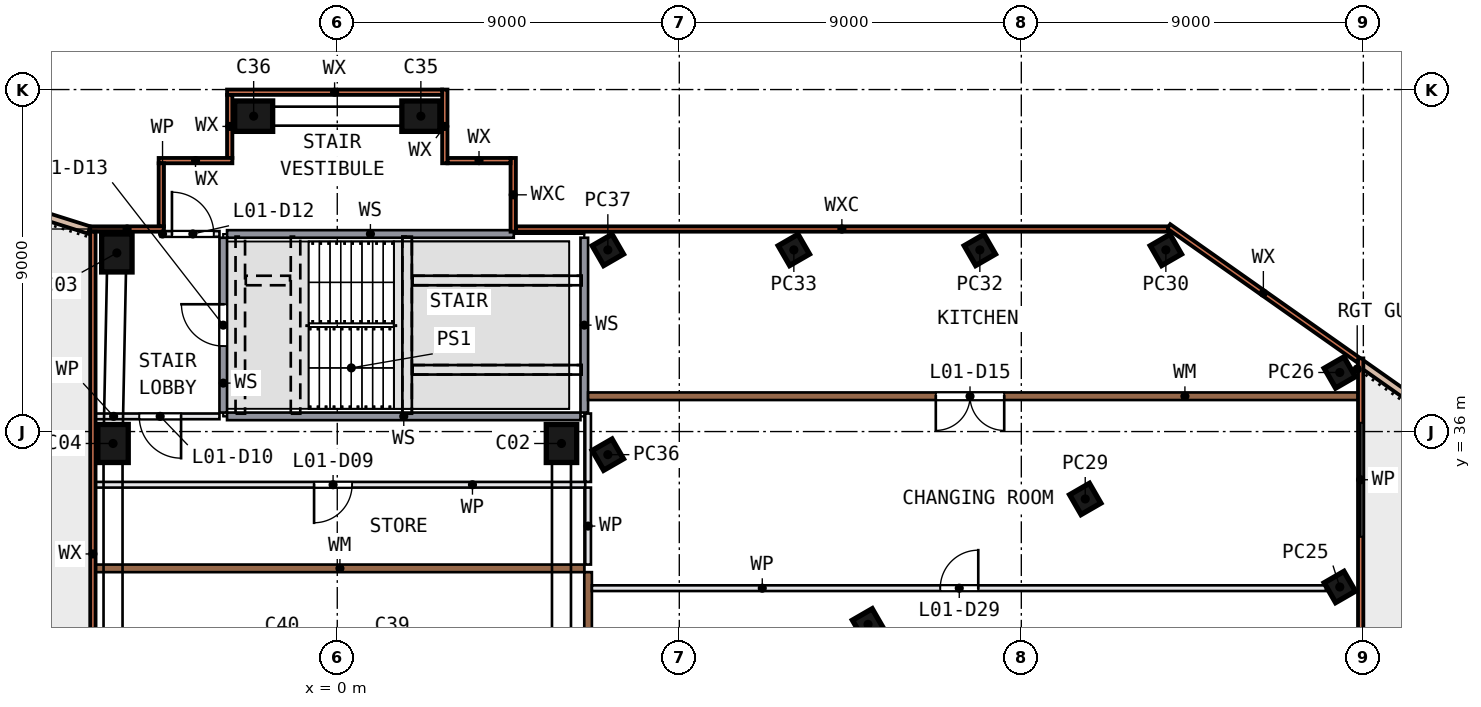
"""IFC4 building model, lengths in metres.
Left out: names, types, materials, properties, quantities, classifications, styles, units other than length and angle.
Written with IfcOpenShell. Run it as: python <this file> out.ifc"""

import sys

from ifc_helpers import new_model, si_unit, direction, frame, frame_2d, origin, origin_2d, place, context, subcontext, project, spatial, polyline, rectangle, outline, extrude, element, fill, save


model = new_model("IFC4")
c1 = context("Model", 3, precision=1e-05, world=origin(), true_north=direction((0.0, 1.0)))
c2 = subcontext(c1, "Body", "Model", "MODEL_VIEW")
j1 = project(units=[si_unit("LENGTHUNIT", "METRE"), si_unit("PLANEANGLEUNIT", "RADIAN")], contexts=[c1])
p1 = place(None, origin())
s1 = spatial("IfcSite", under=j1, at=p1, CompositionType="ELEMENT")
p2 = place(p1, origin())
s2 = spatial("IfcBuilding", under=s1, at=p2, CompositionType="ELEMENT")
p3 = place(p2, frame((0.0, 0.0, 8.0)))
s3 = spatial("IfcBuildingStorey", under=s2, at=p3, CompositionType="ELEMENT", Elevation=8.0)
for number, where, z_axis, x_axis in (
    (1, (5.9, 35.686, 0.0), (0.0, 0.0, 1.0), (0.0, 1.0, 0.0)),
    (2, (-5.8, 40.7, 0.0), (0.0, 0.0, 1.0), (0.0, -1.0, 0.0)),
    (3, (-5.9, 35.686, 0.0), (0.0, 0.0, 1.0), (0.0, -1.0, 0.0)),
    (4, (2.2, 44.3, 0.0), (0.0, 0.0, 1.0), (-1.0, 0.0, 0.0)),
    (5, (-2.2, 44.3, 0.0), (0.0, 0.0, 1.0), (-1.0, 0.0, 0.0)),
):
    element("IfcColumn", number, at=place(p3, frame(where, z_axis=z_axis, x_axis=x_axis)), inside=s3, PredefinedType="COLUMN", context=c2, shape_type="SweptSolid", body=[
        extrude(rectangle(XDim=1.0, YDim=0.8, at=origin_2d()), origin(), (0.0, 0.0, 1.0), 5.55),
    ])
for number, where, z_axis, x_axis in (
    (6, (26.38, 31.91, 0.0), (0.0, 0.0, 1.0), (0.866, 0.5, 0.0)),
    (7, (26.38, 37.555, 0.0), (0.0, 0.0, 1.0), (0.866, 0.5, 0.0)),
    (8, (19.682, 34.227, 0.0), (0.0, 0.0, 1.0), (0.866, 0.5, 0.0)),
    (9, (21.803, 40.78, 0.0), (0.0, 0.0, 1.0), (0.866, 0.5, 0.0)),
    (10, (13.966, 30.927, 0.0), (0.0, 0.0, 1.0), (0.866, 0.5, 0.0)),
    (11, (16.909, 40.78, 0.0), (0.0, 0.0, 1.0), (0.866, 0.5, 0.0)),
    (12, (12.014, 40.78, 0.0), (0.0, 0.0, 1.0), (0.866, 0.5, 0.0)),
    (13, (7.12, 35.392, 0.0), (0.0, 0.0, 1.0), (0.866, 0.5, 0.0)),
    (14, (7.12, 40.78, 0.0), (0.0, 0.0, 1.0), (0.866, 0.5, 0.0)),
):
    element("IfcColumn", number, at=place(p3, frame(where, z_axis=z_axis, x_axis=x_axis)), inside=s3, PredefinedType="COLUMN", context=c2, shape_type="SweptSolid", body=[
        extrude(rectangle(XDim=0.6, YDim=0.6, at=origin_2d()), origin(), (0.0, 0.0, 1.0), 6.0),
    ])
p4 = place(p3, frame((26.93, 20.14, 0.0), z_axis=(0.0, 0.0, 1.0), x_axis=(0.0, 1.0, 0.0)))
e15 = element("IfcWall", 15, at=p4, inside=s3, PredefinedType="SOLIDWALL", context=c2, shape_type="SweptSolid", body=[
    extrude(rectangle(XDim=17.786, YDim=0.14, at=frame_2d((8.893, 0.0))), origin(), (0.0, 0.0, 1.0), 5.55),
])
p5 = place(p4, frame((1.802, 0.0, 0.9)))
e16 = element("IfcOpeningElement", 16, at=p5, cuts=e15, PredefinedType="OPENING", context=c2, shape_type="SweptSolid", body=[
    extrude(rectangle(XDim=3.0, YDim=3.6, at=frame_2d((1.5, 1.8))), frame((0.0, 0.08, 0.0), z_axis=(0.0, -1.0, 0.0), x_axis=(1.0, 0.0, 0.0)), (0.0, 0.0, 1.0), 0.16),
])
p6 = place(p4, frame((7.448, 0.0, 0.9)))
e17 = element("IfcOpeningElement", 17, at=p6, cuts=e15, PredefinedType="OPENING", context=c2, shape_type="SweptSolid", body=[
    extrude(rectangle(XDim=3.0, YDim=3.6, at=frame_2d((1.5, 1.8))), frame((0.0, 0.08, 0.0), z_axis=(0.0, -1.0, 0.0), x_axis=(1.0, 0.0, 0.0)), (0.0, 0.0, 1.0), 0.16),
])
p7 = place(p4, frame((13.092, 0.0, 0.9)))
e18 = element("IfcOpeningElement", 18, at=p7, cuts=e15, PredefinedType="OPENING", context=c2, shape_type="SweptSolid", body=[
    extrude(rectangle(XDim=3.0, YDim=3.6, at=frame_2d((1.5, 1.8))), frame((0.0, 0.08, 0.0), z_axis=(0.0, -1.0, 0.0), x_axis=(1.0, 0.0, 0.0)), (0.0, 0.0, 1.0), 0.16),
])
p8 = place(p3, frame((26.86, 37.889, 0.0), z_axis=(0.0, 0.0, 1.0), x_axis=(-0.817411697, 0.576053919, 0.0)))
e19 = element("IfcWall", 19, at=p8, inside=s3, PredefinedType="SOLIDWALL", context=c2, shape_type="SweptSolid", body=[
    extrude(rectangle(XDim=6.094, YDim=0.14, at=frame_2d((3.047, 0.0))), origin(), (0.0, 0.0, 1.0), 5.55),
])
p9 = place(p3, frame((21.856, 41.33, 0.0), z_axis=(0.0, 0.0, 1.0), x_axis=(-1.0, 0.0, 0.0)))
e20 = element("IfcWall", 20, at=p9, inside=s3, PredefinedType="SOLIDWALL", context=c2, shape_type="SweptSolid", body=[
    extrude(rectangle(XDim=17.156, YDim=0.14, at=frame_2d((8.578, 0.0))), origin(), (0.0, 0.0, 1.0), 5.55),
])
p10 = place(p3, frame((4.63, 41.26, 0.0), z_axis=(0.0, 0.0, 1.0), x_axis=(0.0, 1.0, 0.0)))
e21 = element("IfcWall", 21, at=p10, inside=s3, PredefinedType="SOLIDWALL", context=c2, shape_type="SweptSolid", body=[
    extrude(rectangle(XDim=1.94, YDim=0.14, at=frame_2d((0.97, 0.0))), origin(), (0.0, 0.0, 1.0), 5.55),
])
p11 = place(p3, frame((4.56, 43.13, 0.0), z_axis=(0.0, 0.0, 1.0), x_axis=(-1.0, 0.0, 0.0)))
e22 = element("IfcWall", 22, at=p11, inside=s3, PredefinedType="SOLIDWALL", context=c2, shape_type="SweptSolid", body=[
    extrude(rectangle(XDim=1.66, YDim=0.14, at=frame_2d((0.83, 0.0))), origin(), (0.0, 0.0, 1.0), 5.55),
])
p12 = place(p3, frame((2.83, 43.06, 0.0), z_axis=(0.0, 0.0, 1.0), x_axis=(0.0, 1.0, 0.0)))
e23 = element("IfcWall", 23, at=p12, inside=s3, PredefinedType="SOLIDWALL", context=c2, shape_type="SweptSolid", body=[
    extrude(rectangle(XDim=1.94, YDim=0.14, at=frame_2d((0.97, 0.0))), origin(), (0.0, 0.0, 1.0), 5.55),
])
p13 = place(p3, frame((2.76, 44.93, 0.0), z_axis=(0.0, 0.0, 1.0), x_axis=(-1.0, 0.0, 0.0)))
e24 = element("IfcWall", 24, at=p13, inside=s3, PredefinedType="SOLIDWALL", context=c2, shape_type="SweptSolid", body=[
    extrude(rectangle(XDim=5.66, YDim=0.14, at=frame_2d((2.83, 0.0))), origin(), (0.0, 0.0, 1.0), 5.55),
])
p14 = place(p3, frame((-2.83, 44.86, 0.0), z_axis=(0.0, 0.0, 1.0), x_axis=(0.0, -1.0, 0.0)))
e25 = element("IfcWall", 25, at=p14, inside=s3, PredefinedType="SOLIDWALL", context=c2, shape_type="SweptSolid", body=[
    extrude(rectangle(XDim=1.66, YDim=0.14, at=frame_2d((0.83, 0.0))), origin(), (0.0, 0.0, 1.0), 5.55),
])
p15 = place(p3, frame((-2.76, 43.13, 0.0), z_axis=(0.0, 0.0, 1.0), x_axis=(-1.0, 0.0, 0.0)))
e26 = element("IfcWall", 26, at=p15, inside=s3, PredefinedType="SOLIDWALL", context=c2, shape_type="SweptSolid", body=[
    extrude(rectangle(XDim=1.94, YDim=0.14, at=frame_2d((0.97, 0.0))), origin(), (0.0, 0.0, 1.0), 5.55),
])
p16 = place(p3, frame((-4.63, 43.06, 0.0), z_axis=(0.0, 0.0, 1.0), x_axis=(0.0, -1.0, 0.0)))
e27 = element("IfcWall", 27, at=p16, inside=s3, PredefinedType="SOLIDWALL", context=c2, shape_type="SweptSolid", body=[
    extrude(rectangle(XDim=1.66, YDim=0.14, at=frame_2d((0.83, 0.0))), origin(), (0.0, 0.0, 1.0), 5.55),
])
p17 = place(p3, frame((-4.56, 41.33, 0.0), z_axis=(0.0, 0.0, 1.0), x_axis=(-1.0, 0.0, 0.0)))
e28 = element("IfcWall", 28, at=p17, inside=s3, PredefinedType="SOLIDWALL", context=c2, shape_type="SweptSolid", body=[
    extrude(rectangle(XDim=1.94, YDim=0.14, at=frame_2d((0.97, 0.0))), origin(), (0.0, 0.0, 1.0), 5.55),
])
p18 = place(p3, frame((-6.43, 41.26, 0.0), z_axis=(0.0, 0.0, 1.0), x_axis=(0.0, -1.0, 0.0)))
e29 = element("IfcWall", 29, at=p18, inside=s3, PredefinedType="SOLIDWALL", context=c2, shape_type="SweptSolid", body=[
    extrude(rectangle(XDim=16.961, YDim=0.14, at=frame_2d((8.481, 0.0))), origin(), (0.0, 0.0, 1.0), 5.55),
])
p19 = place(p3, origin())
e30 = element("IfcWall", 30, at=p19, inside=s3, PredefinedType="SOLIDWALL", context=c2, shape_type="SweptSolid", body=[
    extrude(outline(polyline([(-6.56, 41.209), (-6.5, 41.4), (-18.003, 45.035), (-17.987, 44.82), (-6.56, 41.209)])), origin(), (0.0, 0.0, 1.0), 0.45),
])
p20 = place(p3, origin())
e31 = element("IfcWall", 31, at=p20, inside=s3, PredefinedType="SOLIDWALL", context=c2, shape_type="SweptSolid", body=[
    extrude(outline(polyline([(32.328, 33.877), (32.5, 34.0), (27.0, 37.876), (26.885, 37.713), (32.328, 33.877)])), origin(), (0.0, 0.0, 1.0), 0.45),
])
p21 = place(p3, frame((6.525, 34.6, 0.0), z_axis=(0.0, 0.0, 1.0), x_axis=(-1.0, 0.0, 0.0)))
e32 = element("IfcWall", 32, at=p21, inside=s3, PredefinedType="PARTITIONING", context=c2, shape_type="SweptSolid", body=[
    extrude(rectangle(XDim=12.885, YDim=0.15, at=frame_2d((6.442, 0.0))), origin(), (0.0, 0.0, 1.0), 5.55),
])
p22 = place(p21, frame((6.135, 0.0, 0.0)))
e33 = element("IfcOpeningElement", 33, at=p22, cuts=e32, PredefinedType="OPENING", context=c2, shape_type="SweptSolid", body=[
    extrude(rectangle(XDim=1.0, YDim=2.1, at=frame_2d((0.5, 1.05))), frame((0.0, 0.085, 0.0), z_axis=(0.0, -1.0, 0.0), x_axis=(1.0, 0.0, 0.0)), (0.0, 0.0, 1.0), 0.17),
])
p23 = place(p3, frame((-3.1, 36.4, 0.0), z_axis=(0.0, 0.0, 1.0), x_axis=(-1.0, 0.0, 0.0)))
e34 = element("IfcWall", 34, at=p23, inside=s3, PredefinedType="PARTITIONING", context=c2, shape_type="SweptSolid", body=[
    extrude(rectangle(XDim=3.26, YDim=0.15, at=frame_2d((1.63, 0.0))), origin(), (0.0, 0.0, 1.0), 5.55),
])
p24 = place(p23, frame((1.01, 0.0, 0.0)))
e35 = element("IfcOpeningElement", 35, at=p24, cuts=e34, PredefinedType="OPENING", context=c2, shape_type="SweptSolid", body=[
    extrude(rectangle(XDim=1.1, YDim=2.1, at=frame_2d((0.55, 1.05))), frame((0.0, 0.085, 0.0), z_axis=(0.0, -1.0, 0.0), x_axis=(1.0, 0.0, 0.0)), (0.0, 0.0, 1.0), 0.17),
])
p25 = place(p3, frame((-2.9, 36.4, 0.0), z_axis=(0.0, 0.0, 1.0), x_axis=(1.0, 0.0, 0.0)))
e36 = element("IfcWall", 36, at=p25, inside=s3, PredefinedType="SOLIDWALL", context=c2, shape_type="SweptSolid", body=[
    extrude(rectangle(XDim=9.3, YDim=0.2, at=frame_2d((4.65, 0.0))), origin(), (0.0, 0.0, 1.0), 5.55),
])
p26 = place(p3, frame((-4.645, 41.2, 0.0), z_axis=(0.0, 0.0, 1.0), x_axis=(1.0, 0.0, 0.0)))
e37 = element("IfcWall", 37, at=p26, inside=s3, PredefinedType="PARTITIONING", context=c2, shape_type="SweptSolid", body=[
    extrude(rectangle(XDim=1.545, YDim=0.15, at=frame_2d((0.772, 0.0))), origin(), (0.0, 0.0, 1.0), 5.55),
])
p27 = place(p26, frame((0.295, 0.0, 0.0)))
e38 = element("IfcOpeningElement", 38, at=p27, cuts=e37, PredefinedType="OPENING", context=c2, shape_type="SweptSolid", body=[
    extrude(rectangle(XDim=1.1, YDim=2.1, at=frame_2d((0.55, 1.05))), frame((0.0, 0.085, 0.0), z_axis=(0.0, -1.0, 0.0), x_axis=(1.0, 0.0, 0.0)), (0.0, 0.0, 1.0), 0.17),
])
p28 = place(p3, frame((-3.0, 36.5, 0.0), z_axis=(0.0, 0.0, 1.0), x_axis=(0.0, 1.0, 0.0)))
e39 = element("IfcWall", 39, at=p28, inside=s3, PredefinedType="SOLIDWALL", context=c2, shape_type="SweptSolid", body=[
    extrude(rectangle(XDim=4.6, YDim=0.2, at=frame_2d((2.3, 0.0))), origin(), (0.0, 0.0, 1.0), 5.55),
])
p29 = place(p28, frame((1.75, 0.0, 0.0)))
e40 = element("IfcOpeningElement", 40, at=p29, cuts=e39, PredefinedType="OPENING", context=c2, shape_type="SweptSolid", body=[
    extrude(rectangle(XDim=1.1, YDim=2.1, at=frame_2d((0.55, 1.05))), frame((0.0, 0.11, 0.0), z_axis=(0.0, -1.0, 0.0), x_axis=(1.0, 0.0, 0.0)), (0.0, 0.0, 1.0), 0.22),
])
p30 = place(p3, frame((6.5, 36.5, 0.0), z_axis=(0.0, 0.0, 1.0), x_axis=(0.0, 1.0, 0.0)))
e41 = element("IfcWall", 41, at=p30, inside=s3, PredefinedType="SOLIDWALL", context=c2, shape_type="SweptSolid", body=[
    extrude(rectangle(XDim=4.6, YDim=0.2, at=frame_2d((2.3, 0.0))), origin(), (0.0, 0.0, 1.0), 5.55),
])
p31 = place(p3, frame((26.86, 36.929, 0.0), z_axis=(0.0, 0.0, 1.0), x_axis=(-1.0, 0.0, 0.0)))
e42 = element("IfcWall", 42, at=p31, inside=s3, PredefinedType="SOLIDWALL", context=c2, shape_type="SweptSolid", body=[
    extrude(rectangle(XDim=20.26, YDim=0.2, at=frame_2d((10.13, 0.0))), origin(), (0.0, 0.0, 1.0), 5.55),
])
p32 = place(p31, frame((9.31, 0.0, 0.0)))
e43 = element("IfcOpeningElement", 43, at=p32, cuts=e42, PredefinedType="OPENING", context=c2, shape_type="SweptSolid", body=[
    extrude(rectangle(XDim=1.8, YDim=2.1, at=frame_2d((0.9, 1.05))), frame((0.0, 0.11, 0.0), z_axis=(0.0, -1.0, 0.0), x_axis=(1.0, 0.0, 0.0)), (0.0, 0.0, 1.0), 0.22),
])
p33 = place(p3, frame((4.645, 41.2, 0.0), z_axis=(0.0, 0.0, 1.0), x_axis=(-1.0, 0.0, 0.0)))
e44 = element("IfcWall", 44, at=p33, inside=s3, PredefinedType="SOLIDWALL", context=c2, shape_type="SweptSolid", body=[
    extrude(rectangle(XDim=7.545, YDim=0.2, at=frame_2d((3.772, 0.0))), origin(), (0.0, 0.0, 1.0), 5.55),
])
p34 = place(p3, frame((6.6, 23.659, 0.0), z_axis=(0.0, 0.0, 1.0), x_axis=(0.0, 1.0, 0.0)))
e45 = element("IfcWall", 45, at=p34, inside=s3, PredefinedType="SOLIDWALL", context=c2, shape_type="SweptSolid", body=[
    extrude(rectangle(XDim=8.641, YDim=0.2, at=frame_2d((4.32, 0.0))), origin(), (0.0, 0.0, 1.0), 5.55),
])
p35 = place(p3, frame((6.5, 32.4, 0.0), z_axis=(0.0, 0.0, 1.0), x_axis=(-1.0, 0.0, 0.0)))
e46 = element("IfcWall", 46, at=p35, inside=s3, PredefinedType="SOLIDWALL", context=c2, shape_type="SweptSolid", body=[
    extrude(rectangle(XDim=12.86, YDim=0.2, at=frame_2d((6.43, 0.0))), origin(), (0.0, 0.0, 1.0), 5.55),
])
p36 = place(p3, frame((6.6, 32.5, 0.0), z_axis=(0.0, 0.0, 1.0), x_axis=(0.0, 1.0, 0.0)))
e47 = element("IfcWall", 47, at=p36, inside=s3, PredefinedType="PARTITIONING", context=c2, shape_type="SweptSolid", body=[
    extrude(rectangle(XDim=2.025, YDim=0.15, at=frame_2d((1.013, 0.0))), origin(), (0.0, 0.0, 1.0), 5.55),
])
p37 = place(p3, frame((6.6, 34.675, 0.0), z_axis=(0.0, 0.0, 1.0), x_axis=(0.0, 1.0, 0.0)))
e48 = element("IfcWall", 48, at=p37, inside=s3, PredefinedType="PARTITIONING", context=c2, shape_type="SweptSolid", body=[
    extrude(rectangle(XDim=1.8, YDim=0.15, at=frame_2d((0.9, 0.0))), origin(), (0.0, 0.0, 1.0), 5.55),
])
p38 = place(p3, frame((6.7, 31.878, 0.0), z_axis=(0.0, 0.0, 1.0), x_axis=(1.0, 0.0, 0.0)))
e49 = element("IfcWall", 49, at=p38, inside=s3, PredefinedType="PARTITIONING", context=c2, shape_type="SweptSolid", body=[
    extrude(rectangle(XDim=19.317, YDim=0.15, at=frame_2d((9.659, 0.0))), origin(), (0.0, 0.0, 1.0), 5.55),
])
p39 = place(p38, frame((9.167, 0.0, 0.0)))
e50 = element("IfcOpeningElement", 50, at=p39, cuts=e49, PredefinedType="OPENING", context=c2, shape_type="SweptSolid", body=[
    extrude(rectangle(XDim=1.0, YDim=2.1, at=frame_2d((0.5, 1.05))), frame((0.0, 0.085, 0.0), z_axis=(0.0, -1.0, 0.0), x_axis=(1.0, 0.0, 0.0)), (0.0, 0.0, 1.0), 0.17),
])
p40 = place(p7, origin())
e51 = element("IfcWindow", 51, at=p40, inside=s3, PartitioningType="SINGLE_PANEL", PredefinedType="WINDOW", context=c2, shape_type="SweptSolid", body=[
    extrude(rectangle(XDim=3.0, YDim=3.6, at=frame_2d((1.5, 1.8))), frame((0.0, 0.03, 0.0), z_axis=(0.0, -1.0, 0.0), x_axis=(1.0, 0.0, 0.0)), (0.0, 0.0, 1.0), 0.06),
])
fill(e18, e51)
p41 = place(p22, origin())
e52 = element("IfcDoor", 52, at=p41, inside=s3, OperationType="SINGLE_SWING_RIGHT", PredefinedType="DOOR", context=c2, shape_type="SweptSolid", body=[
    extrude(rectangle(XDim=1.0, YDim=2.1, at=frame_2d((0.5, 1.05))), frame((0.0, 0.025, 0.0), z_axis=(0.0, -1.0, 0.0), x_axis=(1.0, 0.0, 0.0)), (0.0, 0.0, 1.0), 0.05),
])
fill(e33, e52)
p42 = place(p24, origin())
e53 = element("IfcDoor", 53, at=p42, inside=s3, OperationType="SINGLE_SWING_LEFT", PredefinedType="DOOR", context=c2, shape_type="SweptSolid", body=[
    extrude(rectangle(XDim=1.1, YDim=2.1, at=frame_2d((0.55, 1.05))), frame((0.0, 0.025, 0.0), z_axis=(0.0, -1.0, 0.0), x_axis=(1.0, 0.0, 0.0)), (0.0, 0.0, 1.0), 0.05),
])
fill(e35, e53)
p43 = place(p27, origin())
e54 = element("IfcDoor", 54, at=p43, inside=s3, OperationType="SINGLE_SWING_LEFT", PredefinedType="DOOR", context=c2, shape_type="SweptSolid", body=[
    extrude(rectangle(XDim=1.1, YDim=2.1, at=frame_2d((0.55, 1.05))), frame((0.0, 0.025, 0.0), z_axis=(0.0, -1.0, 0.0), x_axis=(1.0, 0.0, 0.0)), (0.0, 0.0, 1.0), 0.05),
])
fill(e38, e54)
p44 = place(p29, origin())
e55 = element("IfcDoor", 55, at=p44, inside=s3, OperationType="SINGLE_SWING_RIGHT", PredefinedType="DOOR", context=c2, shape_type="SweptSolid", body=[
    extrude(rectangle(XDim=1.1, YDim=2.1, at=frame_2d((0.55, 1.05))), frame((0.0, 0.025, 0.0), z_axis=(0.0, -1.0, 0.0), x_axis=(1.0, 0.0, 0.0)), (0.0, 0.0, 1.0), 0.05),
])
fill(e40, e55)
p45 = place(p32, origin())
e56 = element("IfcDoor", 56, at=p45, inside=s3, OperationType="DOUBLE_DOOR_SINGLE_SWING", PredefinedType="DOOR", context=c2, shape_type="SweptSolid", body=[
    extrude(rectangle(XDim=1.8, YDim=2.1, at=frame_2d((0.9, 1.05))), frame((0.0, 0.025, 0.0), z_axis=(0.0, -1.0, 0.0), x_axis=(1.0, 0.0, 0.0)), (0.0, 0.0, 1.0), 0.05),
])
fill(e43, e56)
p46 = place(p39, origin())
e57 = element("IfcDoor", 57, at=p46, inside=s3, OperationType="SINGLE_SWING_RIGHT", PredefinedType="DOOR", context=c2, shape_type="SweptSolid", body=[
    extrude(rectangle(XDim=1.0, YDim=2.1, at=frame_2d((0.5, 1.05))), frame((0.0, 0.025, 0.0), z_axis=(0.0, -1.0, 0.0), x_axis=(1.0, 0.0, 0.0)), (0.0, 0.0, 1.0), 0.05),
])
fill(e50, e57)
save(model, sys.argv[1])
